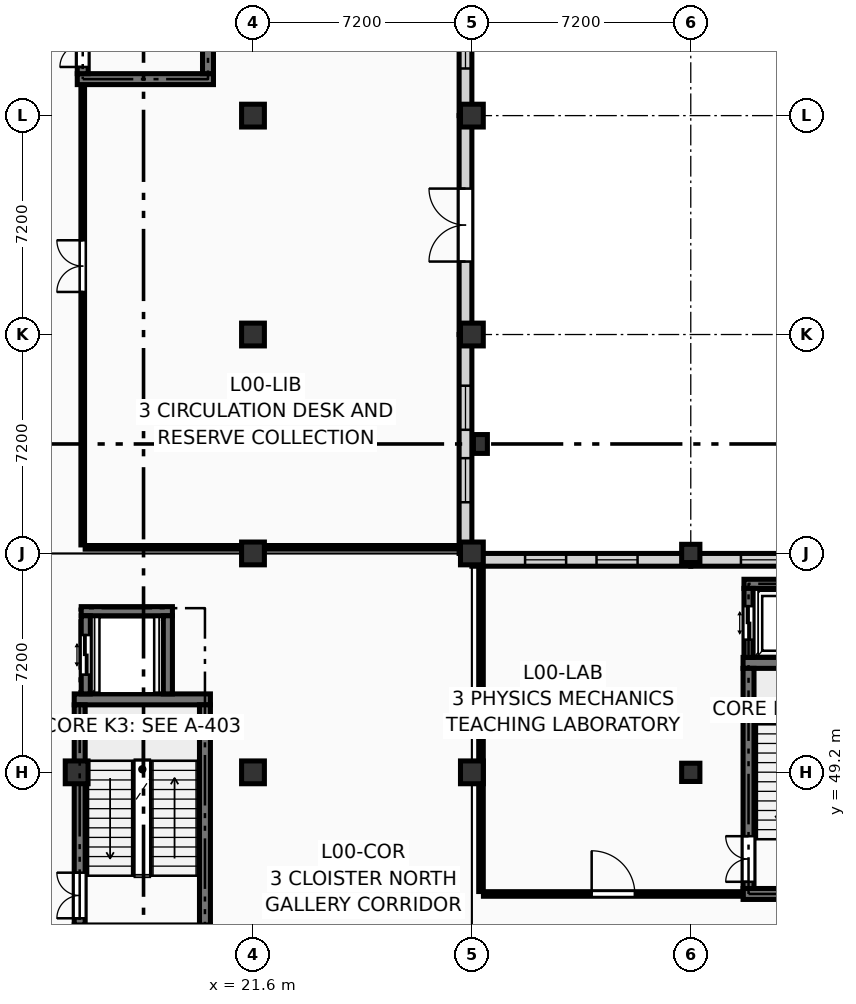
"""IFC4 building model, lengths in metres.
Left out: names, types, materials, properties, quantities, classifications, styles, units other than length and angle.
Written with IfcOpenShell. Run it as: python <this file> out.ifc"""

import sys

from ifc_helpers import new_model, si_unit, direction, frame, frame_2d, origin, origin_2d, place, context, subcontext, project, spatial, rectangle, extrude, element, fill, save


model = new_model("IFC4")
c1 = context("Model", 3, precision=1e-05, world=origin(), true_north=direction((0.0, 1.0)))
c2 = subcontext(c1, "Body", "Model", "MODEL_VIEW")
j1 = project(units=[si_unit("LENGTHUNIT", "METRE"), si_unit("PLANEANGLEUNIT", "RADIAN")], contexts=[c1])
p1 = place(None, origin())
s1 = spatial("IfcSite", under=j1, at=p1, CompositionType="ELEMENT")
p2 = place(p1, origin())
s2 = spatial("IfcBuilding", under=s1, at=p2, CompositionType="ELEMENT")
p3 = place(p2, origin())
s3 = spatial("IfcBuildingStorey", under=s2, at=p3, CompositionType="ELEMENT", Elevation=0.0)
for number, where, z_axis, x_axis in (
    (1, (15.8, 49.2, 0.0), (0.0, 0.0, 1.0), (1.0, 0.0, 0.0)),
    (2, (21.6, 49.2, 0.0), (0.0, 0.0, 1.0), (1.0, 0.0, 0.0)),
    (3, (21.6, 56.4, 0.0), (0.0, 0.0, 1.0), (1.0, 0.0, 0.0)),
    (4, (21.6, 63.6, 0.0), (0.0, 0.0, 1.0), (1.0, 0.0, 0.0)),
    (5, (21.6, 70.8, 0.0), (0.0, 0.0, 1.0), (1.0, 0.0, 0.0)),
    (6, (28.8, 49.2, 0.0), (0.0, 0.0, 1.0), (1.0, 0.0, 0.0)),
    (7, (28.8, 56.4, 0.0), (0.0, 0.0, 1.0), (1.0, 0.0, 0.0)),
    (8, (28.8, 63.6, 0.0), (0.0, 0.0, 1.0), (1.0, 0.0, 0.0)),
    (9, (28.8, 70.8, 0.0), (0.0, 0.0, 1.0), (1.0, 0.0, 0.0)),
):
    element("IfcColumn", number, at=place(p3, frame(where, z_axis=z_axis, x_axis=x_axis)), inside=s3, PredefinedType="COLUMN", context=c2, shape_type="SweptSolid", body=[
        extrude(rectangle(XDim=0.75, YDim=0.75, at=origin_2d()), origin(), (0.0, 0.0, 1.0), 4.5),
    ])
for number, where, z_axis, x_axis in (
    (10, (36.0, 49.2, 0.0), (0.0, 0.0, 1.0), (1.0, 0.0, 0.0)),
    (11, (36.0, 56.4, 0.0), (0.0, 0.0, 1.0), (1.0, 0.0, 0.0)),
):
    element("IfcColumn", number, at=place(p3, frame(where, z_axis=z_axis, x_axis=x_axis)), inside=s3, PredefinedType="COLUMN", context=c2, shape_type="SweptSolid", body=[
        extrude(rectangle(XDim=0.6, YDim=0.6, at=origin_2d()), origin(), (0.0, 0.0, 1.0), 4.5),
    ])
p4 = place(p3, frame((29.08, 60.0, 0.0), z_axis=(0.0, 0.0, 1.0), x_axis=(1.0, 0.0, 0.0)))
e12 = element("IfcColumn", 12, at=p4, inside=s3, PredefinedType="PILASTER", context=c2, shape_type="SweptSolid", body=[
    extrude(rectangle(XDim=0.46, YDim=0.62, at=origin_2d()), origin(), (0.0, 0.0, 1.0), 4.5),
])
p5 = place(p3, frame((28.59, 70.8, 0.0), z_axis=(0.0, 0.0, 1.0), x_axis=(0.0, 1.0, 0.0)))
e13 = element("IfcWall", 13, at=p5, inside=s3, PredefinedType="SOLIDWALL", context=c2, shape_type="SweptSolid", body=[
    extrude(rectangle(XDim=7.2, YDim=0.42, at=frame_2d((3.6, 0.0))), origin(), (0.0, 0.0, 1.0), 3.62),
])
p6 = place(p5, frame((1.55, 0.0, 0.45)))
e14 = element("IfcOpeningElement", 14, at=p6, cuts=e13, PredefinedType="OPENING", context=c2, shape_type="SweptSolid", body=[
    extrude(rectangle(XDim=1.65, YDim=2.6, at=frame_2d((0.825, 1.3))), frame((0.0, 0.222, 0.0), z_axis=(0.0, -1.0, 0.0), x_axis=(1.0, 0.0, 0.0)), (0.0, 0.0, 1.0), 0.444),
])
p7 = place(p5, frame((4.0, 0.0, 0.45)))
e15 = element("IfcOpeningElement", 15, at=p7, cuts=e13, PredefinedType="OPENING", context=c2, shape_type="SweptSolid", body=[
    extrude(rectangle(XDim=1.65, YDim=2.6, at=frame_2d((0.825, 1.3))), frame((0.0, 0.222, 0.0), z_axis=(0.0, -1.0, 0.0), x_axis=(1.0, 0.0, 0.0)), (0.0, 0.0, 1.0), 0.444),
])
p8 = place(p3, frame((28.59, 63.6, 0.0), z_axis=(0.0, 0.0, 1.0), x_axis=(0.0, 1.0, 0.0)))
e16 = element("IfcWall", 16, at=p8, inside=s3, PredefinedType="SOLIDWALL", context=c2, shape_type="SweptSolid", body=[
    extrude(rectangle(XDim=7.2, YDim=0.42, at=frame_2d((3.6, 0.0))), origin(), (0.0, 0.0, 1.0), 3.62),
])
p9 = place(p8, frame((2.4, 0.0, 0.0)))
e17 = element("IfcOpeningElement", 17, at=p9, cuts=e16, PredefinedType="OPENING", context=c2, shape_type="SweptSolid", body=[
    extrude(rectangle(XDim=2.4, YDim=2.6, at=frame_2d((1.2, 1.3))), frame((0.0, 0.222, 0.0), z_axis=(0.0, -1.0, 0.0), x_axis=(1.0, 0.0, 0.0)), (0.0, 0.0, 1.0), 0.444),
])
p10 = place(p3, frame((28.59, 56.4, 0.0), z_axis=(0.0, 0.0, 1.0), x_axis=(0.0, 1.0, 0.0)))
e18 = element("IfcWall", 18, at=p10, inside=s3, PredefinedType="SOLIDWALL", context=c2, shape_type="SweptSolid", body=[
    extrude(rectangle(XDim=7.2, YDim=0.42, at=frame_2d((3.6, 0.0))), origin(), (0.0, 0.0, 1.0), 3.62),
])
p11 = place(p10, frame((1.683, 0.0, 0.45)))
e19 = element("IfcOpeningElement", 19, at=p11, cuts=e18, PredefinedType="OPENING", context=c2, shape_type="SweptSolid", body=[
    extrude(rectangle(XDim=1.45, YDim=2.5, at=frame_2d((0.725, 1.25))), frame((0.0, 0.222, 0.0), z_axis=(0.0, -1.0, 0.0), x_axis=(1.0, 0.0, 0.0)), (0.0, 0.0, 1.0), 0.444),
])
p12 = place(p10, frame((4.067, 0.0, 0.45)))
e20 = element("IfcOpeningElement", 20, at=p12, cuts=e18, PredefinedType="OPENING", context=c2, shape_type="SweptSolid", body=[
    extrude(rectangle(XDim=1.45, YDim=2.5, at=frame_2d((0.725, 1.25))), frame((0.0, 0.222, 0.0), z_axis=(0.0, -1.0, 0.0), x_axis=(1.0, 0.0, 0.0)), (0.0, 0.0, 1.0), 0.444),
])
p13 = place(p3, frame((28.8, 56.19, 0.0), z_axis=(0.0, 0.0, 1.0), x_axis=(1.0, 0.0, 0.0)))
e21 = element("IfcWall", 21, at=p13, inside=s3, PredefinedType="SOLIDWALL", context=c2, shape_type="SweptSolid", body=[
    extrude(rectangle(XDim=7.2, YDim=0.42, at=frame_2d((3.6, 0.0))), origin(), (0.0, 0.0, 1.0), 3.62),
])
p14 = place(p13, frame((1.75, 0.0, 0.45)))
e22 = element("IfcOpeningElement", 22, at=p14, cuts=e21, PredefinedType="OPENING", context=c2, shape_type="SweptSolid", body=[
    extrude(rectangle(XDim=1.35, YDim=2.45, at=frame_2d((0.675, 1.225))), frame((0.0, 0.222, 0.0), z_axis=(0.0, -1.0, 0.0), x_axis=(1.0, 0.0, 0.0)), (0.0, 0.0, 1.0), 0.444),
])
p15 = place(p13, frame((4.1, 0.0, 0.45)))
e23 = element("IfcOpeningElement", 23, at=p15, cuts=e21, PredefinedType="OPENING", context=c2, shape_type="SweptSolid", body=[
    extrude(rectangle(XDim=1.35, YDim=2.45, at=frame_2d((0.675, 1.225))), frame((0.0, 0.222, 0.0), z_axis=(0.0, -1.0, 0.0), x_axis=(1.0, 0.0, 0.0)), (0.0, 0.0, 1.0), 0.444),
])
p16 = place(p3, frame((36.0, 56.19, 0.0), z_axis=(0.0, 0.0, 1.0), x_axis=(1.0, 0.0, 0.0)))
e24 = element("IfcWall", 24, at=p16, inside=s3, PredefinedType="SOLIDWALL", context=c2, shape_type="SweptSolid", body=[
    extrude(rectangle(XDim=7.2, YDim=0.42, at=frame_2d((3.6, 0.0))), origin(), (0.0, 0.0, 1.0), 3.62),
])
p17 = place(p16, frame((1.65, 0.0, 0.45)))
e25 = element("IfcOpeningElement", 25, at=p17, cuts=e24, PredefinedType="OPENING", context=c2, shape_type="SweptSolid", body=[
    extrude(rectangle(XDim=1.5, YDim=2.4, at=frame_2d((0.75, 1.2))), frame((0.0, 0.222, 0.0), z_axis=(0.0, -1.0, 0.0), x_axis=(1.0, 0.0, 0.0)), (0.0, 0.0, 1.0), 0.444),
])
p18 = place(p16, frame((4.05, 0.0, 0.45)))
e26 = element("IfcOpeningElement", 26, at=p18, cuts=e24, PredefinedType="OPENING", context=c2, shape_type="SweptSolid", body=[
    extrude(rectangle(XDim=1.5, YDim=2.4, at=frame_2d((0.75, 1.2))), frame((0.0, 0.222, 0.0), z_axis=(0.0, -1.0, 0.0), x_axis=(1.0, 0.0, 0.0)), (0.0, 0.0, 1.0), 0.444),
])
p19 = place(p3, frame((15.72, 51.6, 0.0), z_axis=(0.0, 0.0, 1.0), x_axis=(1.0, 0.0, 0.0)))
e27 = element("IfcWall", 27, at=p19, inside=s3, PredefinedType="SHEAR", context=c2, shape_type="SweptSolid", body=[
    extrude(rectangle(XDim=4.48, YDim=0.36, at=frame_2d((2.24, 0.0))), origin(), (0.0, 0.0, 1.0), 4.25),
])
p20 = place(p3, frame((15.9, 44.18, 0.0), z_axis=(0.0, 0.0, 1.0), x_axis=(0.0, 1.0, 0.0)))
e28 = element("IfcWall", 28, at=p20, inside=s3, PredefinedType="SHEAR", context=c2, shape_type="SweptSolid", body=[
    extrude(rectangle(XDim=7.24, YDim=0.36, at=frame_2d((3.62, 0.0))), origin(), (0.0, 0.0, 1.0), 4.25),
])
p21 = place(p20, frame((0.22, 0.0, 0.0)))
e29 = element("IfcOpeningElement", 29, at=p21, cuts=e28, PredefinedType="OPENING", context=c2, shape_type="SweptSolid", body=[
    extrude(rectangle(XDim=1.5, YDim=2.2, at=frame_2d((0.75, 1.1))), frame((0.0, 0.192, 0.0), z_axis=(0.0, -1.0, 0.0), x_axis=(1.0, 0.0, 0.0)), (0.0, 0.0, 1.0), 0.384),
])
p22 = place(p3, frame((20.02, 44.18, 0.0), z_axis=(0.0, 0.0, 1.0), x_axis=(0.0, 1.0, 0.0)))
e30 = element("IfcWall", 30, at=p22, inside=s3, PredefinedType="SHEAR", context=c2, shape_type="SweptSolid", body=[
    extrude(rectangle(XDim=7.24, YDim=0.36, at=frame_2d((3.62, 0.0))), origin(), (0.0, 0.0, 1.0), 4.25),
])
for number, where, z_axis, x_axis in (
    (31, (37.72, 45.2, 0.0), (0.0, 0.0, 1.0), (1.0, 0.0, 0.0)),
    (32, (37.72, 52.8, 0.0), (0.0, 0.0, 1.0), (1.0, 0.0, 0.0)),
):
    element("IfcWall", number, at=place(p3, frame(where, z_axis=z_axis, x_axis=x_axis)), inside=s3, PredefinedType="SHEAR", context=c2, shape_type="SweptSolid", body=[
        extrude(rectangle(XDim=4.48, YDim=0.36, at=frame_2d((2.24, 0.0))), origin(), (0.0, 0.0, 1.0), 4.25),
    ])
p23 = place(p3, frame((37.9, 45.38, 0.0), z_axis=(0.0, 0.0, 1.0), x_axis=(0.0, 1.0, 0.0)))
e33 = element("IfcWall", 33, at=p23, inside=s3, PredefinedType="SHEAR", context=c2, shape_type="SweptSolid", body=[
    extrude(rectangle(XDim=7.24, YDim=0.36, at=frame_2d((3.62, 0.0))), origin(), (0.0, 0.0, 1.0), 4.25),
])
p24 = place(p23, frame((0.22, 0.0, 0.0)))
e34 = element("IfcOpeningElement", 34, at=p24, cuts=e33, PredefinedType="OPENING", context=c2, shape_type="SweptSolid", body=[
    extrude(rectangle(XDim=1.5, YDim=2.2, at=frame_2d((0.75, 1.1))), frame((0.0, 0.192, 0.0), z_axis=(0.0, -1.0, 0.0), x_axis=(1.0, 0.0, 0.0)), (0.0, 0.0, 1.0), 0.384),
])
p25 = place(p3, frame((15.82, 72.0, 0.0), z_axis=(0.0, 0.0, 1.0), x_axis=(1.0, 0.0, 0.0)))
e35 = element("IfcWall", 35, at=p25, inside=s3, PredefinedType="SHEAR", context=c2, shape_type="SweptSolid", body=[
    extrude(rectangle(XDim=4.48, YDim=0.36, at=frame_2d((2.24, 0.0))), origin(), (0.0, 0.0, 1.0), 4.25),
])
p26 = place(p3, frame((16.0, 72.18, 0.0), z_axis=(0.0, 0.0, 1.0), x_axis=(0.0, 1.0, 0.0)))
e36 = element("IfcWall", 36, at=p26, inside=s3, PredefinedType="SHEAR", context=c2, shape_type="SweptSolid", body=[
    extrude(rectangle(XDim=7.24, YDim=0.36, at=frame_2d((3.62, 0.0))), origin(), (0.0, 0.0, 1.0), 4.25),
])
p27 = place(p26, frame((0.22, 0.0, 0.0)))
e37 = element("IfcOpeningElement", 37, at=p27, cuts=e36, PredefinedType="OPENING", context=c2, shape_type="SweptSolid", body=[
    extrude(rectangle(XDim=1.5, YDim=2.2, at=frame_2d((0.75, 1.1))), frame((0.0, 0.192, 0.0), z_axis=(0.0, -1.0, 0.0), x_axis=(1.0, 0.0, 0.0)), (0.0, 0.0, 1.0), 0.384),
])
p28 = place(p3, frame((20.12, 72.18, 0.0), z_axis=(0.0, 0.0, 1.0), x_axis=(0.0, 1.0, 0.0)))
e38 = element("IfcWall", 38, at=p28, inside=s3, PredefinedType="SHEAR", context=c2, shape_type="SweptSolid", body=[
    extrude(rectangle(XDim=7.24, YDim=0.36, at=frame_2d((3.62, 0.0))), origin(), (0.0, 0.0, 1.0), 4.25),
])
p29 = place(p3, frame((37.75, 55.4, 0.0), z_axis=(0.0, 0.0, 1.0), x_axis=(1.0, 0.0, 0.0)))
e39 = element("IfcWall", 39, at=p29, inside=s3, PredefinedType="SHEAR", context=c2, shape_type="SweptSolid", body=[
    extrude(rectangle(XDim=2.7, YDim=0.3, at=frame_2d((1.35, 0.0))), origin(), (0.0, 0.0, 1.0), 4.25),
])
p30 = place(p3, frame((37.9, 52.98, 0.0), z_axis=(0.0, 0.0, 1.0), x_axis=(0.0, 1.0, 0.0)))
e40 = element("IfcWall", 40, at=p30, inside=s3, PredefinedType="SHEAR", context=c2, shape_type="SweptSolid", body=[
    extrude(rectangle(XDim=2.27, YDim=0.3, at=frame_2d((1.135, 0.0))), origin(), (0.0, 0.0, 1.0), 4.25),
])
p31 = place(p30, frame((0.585, 0.0, 0.0)))
e41 = element("IfcOpeningElement", 41, at=p31, cuts=e40, PredefinedType="OPENING", context=c2, shape_type="SweptSolid", body=[
    extrude(rectangle(XDim=1.1, YDim=2.2, at=frame_2d((0.55, 1.1))), frame((0.0, 0.162, 0.0), z_axis=(0.0, -1.0, 0.0), x_axis=(1.0, 0.0, 0.0)), (0.0, 0.0, 1.0), 0.324),
])
p32 = place(p3, frame((15.95, 54.5, 0.0), z_axis=(0.0, 0.0, 1.0), x_axis=(1.0, 0.0, 0.0)))
e42 = element("IfcWall", 42, at=p32, inside=s3, PredefinedType="SHEAR", context=c2, shape_type="SweptSolid", body=[
    extrude(rectangle(XDim=3.0, YDim=0.3, at=frame_2d((1.5, 0.0))), origin(), (0.0, 0.0, 1.0), 4.25),
])
p33 = place(p3, frame((16.1, 51.78, 0.0), z_axis=(0.0, 0.0, 1.0), x_axis=(0.0, 1.0, 0.0)))
e43 = element("IfcWall", 43, at=p33, inside=s3, PredefinedType="SHEAR", context=c2, shape_type="SweptSolid", body=[
    extrude(rectangle(XDim=2.57, YDim=0.3, at=frame_2d((1.285, 0.0))), origin(), (0.0, 0.0, 1.0), 4.25),
])
p34 = place(p33, frame((0.635, 0.0, 0.0)))
e44 = element("IfcOpeningElement", 44, at=p34, cuts=e43, PredefinedType="OPENING", context=c2, shape_type="SweptSolid", body=[
    extrude(rectangle(XDim=1.3, YDim=2.25, at=frame_2d((0.65, 1.125))), frame((0.0, 0.162, 0.0), z_axis=(0.0, -1.0, 0.0), x_axis=(1.0, 0.0, 0.0)), (0.0, 0.0, 1.0), 0.324),
])
p35 = place(p3, frame((18.8, 51.78, 0.0), z_axis=(0.0, 0.0, 1.0), x_axis=(0.0, 1.0, 0.0)))
e45 = element("IfcWall", 45, at=p35, inside=s3, PredefinedType="SHEAR", context=c2, shape_type="SweptSolid", body=[
    extrude(rectangle(XDim=2.57, YDim=0.3, at=frame_2d((1.285, 0.0))), origin(), (0.0, 0.0, 1.0), 4.25),
])
p36 = place(p3, frame((29.1, 45.28, 0.0), z_axis=(0.0, 0.0, 1.0), x_axis=(0.0, 1.0, 0.0)))
e46 = element("IfcWall", 46, at=p36, inside=s3, PredefinedType="PARTITIONING", context=c2, shape_type="SweptSolid", body=[
    extrude(rectangle(XDim=10.64, YDim=0.15, at=frame_2d((5.32, 0.0))), origin(), (0.0, 0.0, 1.0), 3.385),
])
p37 = place(p3, frame((29.18, 45.2, 0.0), z_axis=(0.0, 0.0, 1.0), x_axis=(1.0, 0.0, 0.0)))
e47 = element("IfcWall", 47, at=p37, inside=s3, PredefinedType="PARTITIONING", context=c2, shape_type="SweptSolid", body=[
    extrude(rectangle(XDim=8.54, YDim=0.15, at=frame_2d((4.27, 0.0))), origin(), (0.0, 0.0, 1.0), 4.235),
])
p38 = place(p37, frame((3.56, 0.0, 0.0)))
e48 = element("IfcOpeningElement", 48, at=p38, cuts=e47, PredefinedType="OPENING", context=c2, shape_type="SweptSolid", body=[
    extrude(rectangle(XDim=1.42, YDim=2.22, at=frame_2d((0.71, 1.11))), frame((0.0, 0.087, 0.0), z_axis=(0.0, -1.0, 0.0), x_axis=(1.0, 0.0, 0.0)), (0.0, 0.0, 1.0), 0.174),
])
p39 = place(p3, frame((16.0, 56.68, 0.0), z_axis=(0.0, 0.0, 1.0), x_axis=(0.0, 1.0, 0.0)))
e49 = element("IfcWall", 49, at=p39, inside=s3, PredefinedType="PARTITIONING", context=c2, shape_type="SweptSolid", body=[
    extrude(rectangle(XDim=15.1, YDim=0.12, at=frame_2d((7.55, 0.0))), origin(), (0.0, 0.0, 1.0), 4.235),
])
p40 = place(p39, frame((8.32, 0.0, 0.0)))
e50 = element("IfcOpeningElement", 50, at=p40, cuts=e49, PredefinedType="OPENING", context=c2, shape_type="SweptSolid", body=[
    extrude(rectangle(XDim=1.7, YDim=2.28, at=frame_2d((0.85, 1.14))), frame((0.0, 0.072, 0.0), z_axis=(0.0, -1.0, 0.0), x_axis=(1.0, 0.0, 0.0)), (0.0, 0.0, 1.0), 0.144),
])
p41 = place(p3, frame((16.08, 56.6, 0.0), z_axis=(0.0, 0.0, 1.0), x_axis=(1.0, 0.0, 0.0)))
e51 = element("IfcWall", 51, at=p41, inside=s3, PredefinedType="PARTITIONING", context=c2, shape_type="SweptSolid", body=[
    extrude(rectangle(XDim=12.24, YDim=0.12, at=frame_2d((6.12, 0.0))), origin(), (0.0, 0.0, 1.0), 3.485),
])
p42 = place(p6, origin())
e52 = element("IfcWindow", 52, at=p42, inside=s3, PartitioningType="SINGLE_PANEL", PredefinedType="WINDOW", context=c2, shape_type="SweptSolid", body=[
    extrude(rectangle(XDim=1.65, YDim=2.6, at=frame_2d((0.825, 1.3))), frame((0.0, 0.03, 0.0), z_axis=(0.0, -1.0, 0.0), x_axis=(1.0, 0.0, 0.0)), (0.0, 0.0, 1.0), 0.06),
])
fill(e14, e52)
p43 = place(p9, origin())
e53 = element("IfcDoor", 53, at=p43, inside=s3, OperationType="DOUBLE_DOOR_SINGLE_SWING", PredefinedType="GATE", context=c2, shape_type="SweptSolid", body=[
    extrude(rectangle(XDim=2.4, YDim=2.6, at=frame_2d((1.2, 1.3))), frame((0.0, 0.025, 0.0), z_axis=(0.0, -1.0, 0.0), x_axis=(1.0, 0.0, 0.0)), (0.0, 0.0, 1.0), 0.05),
])
fill(e17, e53)
p44 = place(p11, origin())
e54 = element("IfcWindow", 54, at=p44, inside=s3, PartitioningType="SINGLE_PANEL", PredefinedType="WINDOW", context=c2, shape_type="SweptSolid", body=[
    extrude(rectangle(XDim=1.45, YDim=2.5, at=frame_2d((0.725, 1.25))), frame((0.0, 0.03, 0.0), z_axis=(0.0, -1.0, 0.0), x_axis=(1.0, 0.0, 0.0)), (0.0, 0.0, 1.0), 0.06),
])
fill(e19, e54)
p45 = place(p12, origin())
e55 = element("IfcWindow", 55, at=p45, inside=s3, PartitioningType="SINGLE_PANEL", PredefinedType="WINDOW", context=c2, shape_type="SweptSolid", body=[
    extrude(rectangle(XDim=1.45, YDim=2.5, at=frame_2d((0.725, 1.25))), frame((0.0, 0.03, 0.0), z_axis=(0.0, -1.0, 0.0), x_axis=(1.0, 0.0, 0.0)), (0.0, 0.0, 1.0), 0.06),
])
fill(e20, e55)
p46 = place(p14, origin())
e56 = element("IfcWindow", 56, at=p46, inside=s3, PartitioningType="SINGLE_PANEL", PredefinedType="WINDOW", context=c2, shape_type="SweptSolid", body=[
    extrude(rectangle(XDim=1.35, YDim=2.45, at=frame_2d((0.675, 1.225))), frame((0.0, 0.03, 0.0), z_axis=(0.0, -1.0, 0.0), x_axis=(1.0, 0.0, 0.0)), (0.0, 0.0, 1.0), 0.06),
])
fill(e22, e56)
p47 = place(p15, origin())
e57 = element("IfcWindow", 57, at=p47, inside=s3, PartitioningType="SINGLE_PANEL", PredefinedType="WINDOW", context=c2, shape_type="SweptSolid", body=[
    extrude(rectangle(XDim=1.35, YDim=2.45, at=frame_2d((0.675, 1.225))), frame((0.0, 0.03, 0.0), z_axis=(0.0, -1.0, 0.0), x_axis=(1.0, 0.0, 0.0)), (0.0, 0.0, 1.0), 0.06),
])
fill(e23, e57)
p48 = place(p17, origin())
e58 = element("IfcWindow", 58, at=p48, inside=s3, PartitioningType="SINGLE_PANEL", PredefinedType="WINDOW", context=c2, shape_type="SweptSolid", body=[
    extrude(rectangle(XDim=1.5, YDim=2.4, at=frame_2d((0.75, 1.2))), frame((0.0, 0.03, 0.0), z_axis=(0.0, -1.0, 0.0), x_axis=(1.0, 0.0, 0.0)), (0.0, 0.0, 1.0), 0.06),
])
fill(e25, e58)
p49 = place(p21, origin())
e59 = element("IfcDoor", 59, at=p49, inside=s3, OperationType="DOUBLE_DOOR_SINGLE_SWING", PredefinedType="DOOR", context=c2, shape_type="SweptSolid", body=[
    extrude(rectangle(XDim=1.5, YDim=2.2, at=frame_2d((0.75, 1.1))), frame((0.0, 0.025, 0.0), z_axis=(0.0, -1.0, 0.0), x_axis=(1.0, 0.0, 0.0)), (0.0, 0.0, 1.0), 0.05),
])
fill(e29, e59)
p50 = place(p24, origin())
e60 = element("IfcDoor", 60, at=p50, inside=s3, OperationType="DOUBLE_DOOR_SINGLE_SWING", PredefinedType="DOOR", context=c2, shape_type="SweptSolid", body=[
    extrude(rectangle(XDim=1.5, YDim=2.2, at=frame_2d((0.75, 1.1))), frame((0.0, 0.025, 0.0), z_axis=(0.0, -1.0, 0.0), x_axis=(1.0, 0.0, 0.0)), (0.0, 0.0, 1.0), 0.05),
])
fill(e34, e60)
p51 = place(p27, origin())
e61 = element("IfcDoor", 61, at=p51, inside=s3, OperationType="DOUBLE_DOOR_SINGLE_SWING", PredefinedType="DOOR", context=c2, shape_type="SweptSolid", body=[
    extrude(rectangle(XDim=1.5, YDim=2.2, at=frame_2d((0.75, 1.1))), frame((0.0, 0.025, 0.0), z_axis=(0.0, -1.0, 0.0), x_axis=(1.0, 0.0, 0.0)), (0.0, 0.0, 1.0), 0.05),
])
fill(e37, e61)
p52 = place(p31, origin())
e62 = element("IfcDoor", 62, at=p52, inside=s3, OperationType="DOUBLE_DOOR_SLIDING", PredefinedType="DOOR", context=c2, shape_type="SweptSolid", body=[
    extrude(rectangle(XDim=1.1, YDim=2.2, at=frame_2d((0.55, 1.1))), frame((0.0, 0.025, 0.0), z_axis=(0.0, -1.0, 0.0), x_axis=(1.0, 0.0, 0.0)), (0.0, 0.0, 1.0), 0.05),
])
fill(e41, e62)
p53 = place(p34, origin())
e63 = element("IfcDoor", 63, at=p53, inside=s3, OperationType="DOUBLE_DOOR_SLIDING", PredefinedType="DOOR", context=c2, shape_type="SweptSolid", body=[
    extrude(rectangle(XDim=1.3, YDim=2.25, at=frame_2d((0.65, 1.125))), frame((0.0, 0.025, 0.0), z_axis=(0.0, -1.0, 0.0), x_axis=(1.0, 0.0, 0.0)), (0.0, 0.0, 1.0), 0.05),
])
fill(e44, e63)
p54 = place(p38, origin())
e64 = element("IfcDoor", 64, at=p54, inside=s3, OperationType="SINGLE_SWING_LEFT", PredefinedType="DOOR", context=c2, shape_type="SweptSolid", body=[
    extrude(rectangle(XDim=1.42, YDim=2.22, at=frame_2d((0.71, 1.11))), frame((0.0, 0.025, 0.0), z_axis=(0.0, -1.0, 0.0), x_axis=(1.0, 0.0, 0.0)), (0.0, 0.0, 1.0), 0.05),
])
fill(e48, e64)
p55 = place(p40, origin())
e65 = element("IfcDoor", 65, at=p55, inside=s3, OperationType="DOUBLE_DOOR_SINGLE_SWING", PredefinedType="DOOR", context=c2, shape_type="SweptSolid", body=[
    extrude(rectangle(XDim=1.7, YDim=2.28, at=frame_2d((0.85, 1.14))), frame((0.0, 0.025, 0.0), z_axis=(0.0, -1.0, 0.0), x_axis=(1.0, 0.0, 0.0)), (0.0, 0.0, 1.0), 0.05),
])
fill(e50, e65)
save(model, sys.argv[1])
